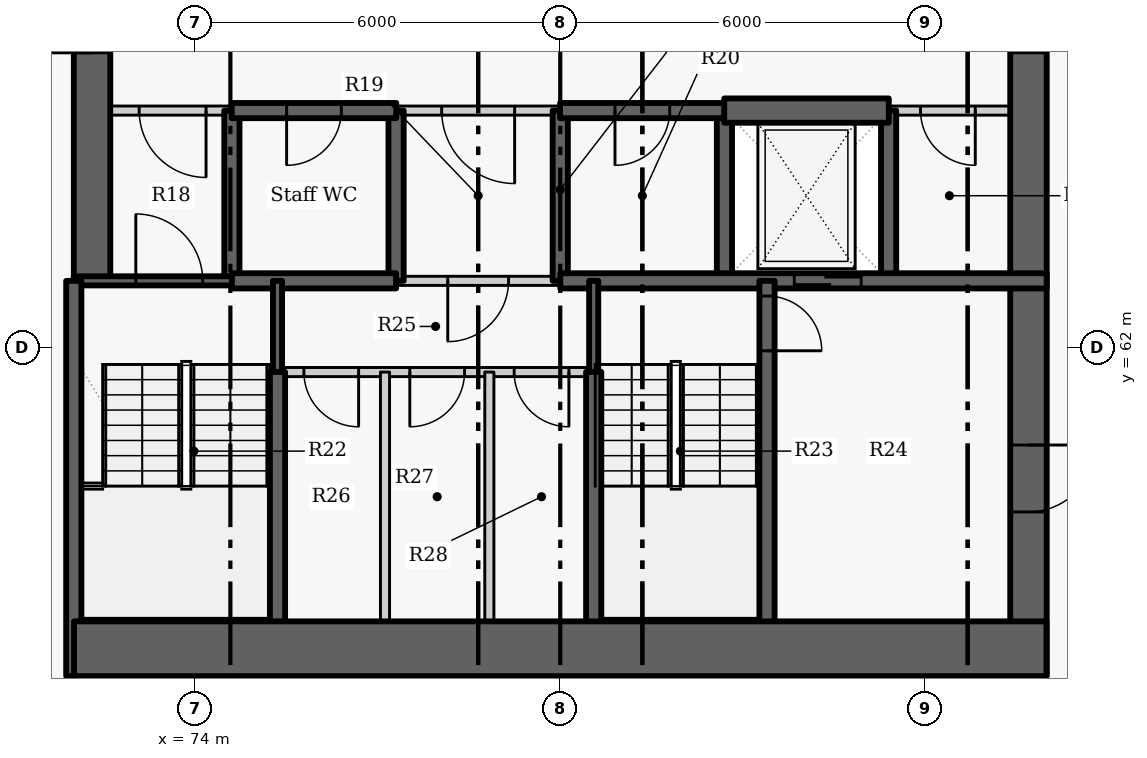
"""IFC4 building model, lengths in metres.
Left out: names, types, materials, properties, quantities, classifications, styles, units other than length and angle.
Written with IfcOpenShell. Run it as: python <this file> out.ifc"""

import sys

from ifc_helpers import new_model, si_unit, direction, frame, frame_2d, origin, place, context, subcontext, project, spatial, rectangle, extrude, element, fill, save


model = new_model("IFC4")
c1 = context("Model", 3, precision=1e-05, world=origin(), true_north=direction((0.0, 1.0)))
c2 = subcontext(c1, "Body", "Model", "MODEL_VIEW")
j1 = project(units=[si_unit("LENGTHUNIT", "METRE"), si_unit("PLANEANGLEUNIT", "RADIAN")], contexts=[c1])
p1 = place(None, origin())
s1 = spatial("IfcSite", under=j1, at=p1, CompositionType="ELEMENT")
p2 = place(p1, origin())
s2 = spatial("IfcBuilding", under=s1, at=p2, CompositionType="ELEMENT")
p3 = place(p2, frame((0.0, 0.0, 28.2)))
s3 = spatial("IfcBuildingStorey", under=s2, at=p3, CompositionType="ELEMENT", Elevation=28.2)
p4 = place(p3, frame((74.6, 63.1, -0.275), z_axis=(0.0, 0.0, 1.0), x_axis=(0.0, 1.0, 0.0)))
e1 = element("IfcWall", 1, at=p4, inside=s3, PredefinedType="SHEAR", context=c2, shape_type="SweptSolid", body=[
    extrude(rectangle(XDim=2.8, YDim=0.25, at=frame_2d((1.4, 0.0))), origin(), (0.0, 0.0, 1.0), 3.3),
])
p5 = place(p3, frame((72.3, 63.1, -0.275), z_axis=(0.0, 0.0, 1.0), x_axis=(0.0, 1.0, 0.0)))
e2 = element("IfcWall", 2, at=p5, inside=s3, PredefinedType="SHEAR", context=c2, shape_type="SweptSolid", body=[
    extrude(rectangle(XDim=9.1, YDim=0.6, at=frame_2d((4.55, 0.0))), origin(), (0.0, 0.0, 1.0), 3.3),
])
p6 = place(p5, frame((3.75, 0.0, 0.275)))
e3 = element("IfcOpeningElement", 3, at=p6, cuts=e2, PredefinedType="OPENING", context=c2, shape_type="SweptSolid", body=[
    extrude(rectangle(XDim=1.5, YDim=2.1, at=frame_2d((0.75, 1.05))), frame((0.0, 0.31, 0.0), z_axis=(0.0, -1.0, 0.0), x_axis=(1.0, 0.0, 0.0)), (0.0, 0.0, 1.0), 0.62),
])
for number, where, z_axis, x_axis in (
    (4, (77.3, 63.1, -0.275), (0.0, 0.0, 1.0), (0.0, 1.0, 0.0)),
    (5, (80.0, 63.1, -0.275), (0.0, 0.0, 1.0), (0.0, 1.0, 0.0)),
    (6, (82.7, 63.1, -0.275), (0.0, 0.0, 1.0), (0.0, 1.0, 0.0)),
    (7, (85.4, 63.1, -0.275), (0.0, 0.0, 1.0), (0.0, 1.0, 0.0)),
):
    element("IfcWall", number, at=place(p3, frame(where, z_axis=z_axis, x_axis=x_axis)), inside=s3, PredefinedType="SHEAR", context=c2, shape_type="SweptSolid", body=[
        extrude(rectangle(XDim=2.8, YDim=0.25, at=frame_2d((1.4, 0.0))), origin(), (0.0, 0.0, 1.0), 3.3),
    ])
p7 = place(p3, frame((87.7, 72.2, -0.275), z_axis=(0.0, 0.0, 1.0), x_axis=(0.0, -1.0, 0.0)))
e8 = element("IfcWall", 8, at=p7, inside=s3, PredefinedType="SHEAR", context=c2, shape_type="SweptSolid", body=[
    extrude(rectangle(XDim=15.6, YDim=0.6, at=frame_2d((7.8, 0.0))), origin(), (0.0, 0.0, 1.0), 3.3),
])
p8 = place(p7, frame((3.85, 0.0, 0.275)))
e9 = element("IfcOpeningElement", 9, at=p8, cuts=e8, PredefinedType="OPENING", context=c2, shape_type="SweptSolid", body=[
    extrude(rectangle(XDim=1.5, YDim=2.1, at=frame_2d((0.75, 1.05))), frame((0.0, 0.31, 0.0), z_axis=(0.0, -1.0, 0.0), x_axis=(1.0, 0.0, 0.0)), (0.0, 0.0, 1.0), 0.62),
])
p9 = place(p7, frame((11.8, 0.0, 0.275)))
e10 = element("IfcOpeningElement", 10, at=p9, cuts=e8, PredefinedType="OPENING", context=c2, shape_type="SweptSolid", body=[
    extrude(rectangle(XDim=1.1, YDim=2.1, at=frame_2d((0.55, 1.05))), frame((0.0, 0.31, 0.0), z_axis=(0.0, -1.0, 0.0), x_axis=(1.0, 0.0, 0.0)), (0.0, 0.0, 1.0), 0.62),
])
p10 = place(p3, frame((74.603, 65.9, 0.0), z_axis=(0.0, 0.0, 1.0), x_axis=(-1.0, 0.0, 0.0)))
e11 = element("IfcWall", 11, at=p10, inside=s3, PredefinedType="PARTITIONING", context=c2, shape_type="SweptSolid", body=[
    extrude(rectangle(XDim=2.603, YDim=0.15, at=frame_2d((1.302, 0.0))), origin(), (0.0, 0.0, 1.0), 3.025),
])
p11 = place(p10, frame((0.428, 0.0, 0.0)))
e12 = element("IfcOpeningElement", 12, at=p11, cuts=e11, PredefinedType="OPENING", context=c2, shape_type="SweptSolid", body=[
    extrude(rectangle(XDim=1.1, YDim=2.1, at=frame_2d((0.55, 1.05))), frame((0.0, 0.085, 0.0), z_axis=(0.0, -1.0, 0.0), x_axis=(1.0, 0.0, 0.0)), (0.0, 0.0, 1.0), 0.17),
])
p12 = place(p3, frame((80.003, 65.9, 0.0), z_axis=(0.0, 0.0, 1.0), x_axis=(-1.0, 0.0, 0.0)))
e13 = element("IfcWall", 13, at=p12, inside=s3, PredefinedType="PARTITIONING", context=c2, shape_type="SweptSolid", body=[
    extrude(rectangle(XDim=2.706, YDim=0.15, at=frame_2d((1.353, 0.0))), origin(), (0.0, 0.0, 1.0), 3.025),
])
p13 = place(p12, frame((0.753, 0.0, 0.0)))
e14 = element("IfcOpeningElement", 14, at=p13, cuts=e13, PredefinedType="OPENING", context=c2, shape_type="SweptSolid", body=[
    extrude(rectangle(XDim=1.2, YDim=2.1, at=frame_2d((0.6, 1.05))), frame((0.0, 0.085, 0.0), z_axis=(0.0, -1.0, 0.0), x_axis=(1.0, 0.0, 0.0)), (0.0, 0.0, 1.0), 0.17),
])
p14 = place(p3, frame((88.0, 65.9, 0.0), z_axis=(0.0, 0.0, 1.0), x_axis=(-1.0, 0.0, 0.0)))
e15 = element("IfcWall", 15, at=p14, inside=s3, PredefinedType="PARTITIONING", context=c2, shape_type="SweptSolid", body=[
    extrude(rectangle(XDim=2.603, YDim=0.15, at=frame_2d((1.302, 0.0))), origin(), (0.0, 0.0, 1.0), 3.025),
])
p15 = place(p14, frame((1.175, 0.0, 0.0)))
e16 = element("IfcOpeningElement", 16, at=p15, cuts=e15, PredefinedType="OPENING", context=c2, shape_type="SweptSolid", body=[
    extrude(rectangle(XDim=0.9, YDim=2.1, at=frame_2d((0.45, 1.05))), frame((0.0, 0.085, 0.0), z_axis=(0.0, -1.0, 0.0), x_axis=(1.0, 0.0, 0.0)), (0.0, 0.0, 1.0), 0.17),
])
p16 = place(p3, frame((77.303, 65.9, -0.275), z_axis=(0.0, 0.0, 1.0), x_axis=(-1.0, 0.0, 0.0)))
e17 = element("IfcWall", 17, at=p16, inside=s3, PredefinedType="SHEAR", context=c2, shape_type="SweptSolid", body=[
    extrude(rectangle(XDim=2.706, YDim=0.25, at=frame_2d((1.353, 0.0))), origin(), (0.0, 0.0, 1.0), 3.3),
])
p17 = place(p16, frame((0.903, 0.0, 0.275)))
e18 = element("IfcOpeningElement", 18, at=p17, cuts=e17, PredefinedType="OPENING", context=c2, shape_type="SweptSolid", body=[
    extrude(rectangle(XDim=0.9, YDim=2.1, at=frame_2d((0.45, 1.05))), frame((0.0, 0.135, 0.0), z_axis=(0.0, -1.0, 0.0), x_axis=(1.0, 0.0, 0.0)), (0.0, 0.0, 1.0), 0.27),
])
p18 = place(p3, frame((82.703, 65.9, -0.275), z_axis=(0.0, 0.0, 1.0), x_axis=(-1.0, 0.0, 0.0)))
e19 = element("IfcWall", 19, at=p18, inside=s3, PredefinedType="SHEAR", context=c2, shape_type="SweptSolid", body=[
    extrude(rectangle(XDim=2.706, YDim=0.25, at=frame_2d((1.353, 0.0))), origin(), (0.0, 0.0, 1.0), 3.3),
])
p19 = place(p18, frame((0.903, 0.0, 0.275)))
e20 = element("IfcOpeningElement", 20, at=p19, cuts=e19, PredefinedType="OPENING", context=c2, shape_type="SweptSolid", body=[
    extrude(rectangle(XDim=0.9, YDim=2.1, at=frame_2d((0.45, 1.05))), frame((0.0, 0.135, 0.0), z_axis=(0.0, -1.0, 0.0), x_axis=(1.0, 0.0, 0.0)), (0.0, 0.0, 1.0), 0.27),
])
p20 = place(p3, frame((82.697, 65.9, -0.275), z_axis=(0.0, 0.0, 1.0), x_axis=(1.0, 0.0, 0.0)))
e21 = element("IfcWall", 21, at=p20, inside=s3, PredefinedType="SHEAR", context=c2, shape_type="SweptSolid", body=[
    extrude(rectangle(XDim=2.706, YDim=0.4, at=frame_2d((1.353, 0.0))), origin(), (0.0, 0.0, 1.0), 3.3),
])
p21 = place(p3, frame((72.0, 63.1, -0.275), z_axis=(0.0, 0.0, 1.0), x_axis=(1.0, 0.0, 0.0)))
e22 = element("IfcWall", 22, at=p21, inside=s3, PredefinedType="SHEAR", context=c2, shape_type="SweptSolid", body=[
    extrude(rectangle(XDim=2.6, YDim=0.15, at=frame_2d((1.3, 0.0))), origin(), (0.0, 0.0, 1.0), 3.3),
])
p22 = place(p21, frame((1.02, 0.0, 0.275)))
e23 = element("IfcOpeningElement", 23, at=p22, cuts=e22, PredefinedType="OPENING", context=c2, shape_type="SweptSolid", body=[
    extrude(rectangle(XDim=1.1, YDim=2.1, at=frame_2d((0.55, 1.05))), frame((0.0, 0.085, 0.0), z_axis=(0.0, -1.0, 0.0), x_axis=(1.0, 0.0, 0.0)), (0.0, 0.0, 1.0), 0.17),
])
p23 = place(p3, frame((74.6, 63.1, -0.275), z_axis=(0.0, 0.0, 1.0), x_axis=(1.0, 0.0, 0.0)))
e24 = element("IfcWall", 24, at=p23, inside=s3, PredefinedType="SHEAR", context=c2, shape_type="SweptSolid", body=[
    extrude(rectangle(XDim=2.7, YDim=0.25, at=frame_2d((1.35, 0.0))), origin(), (0.0, 0.0, 1.0), 3.3),
])
p24 = place(p3, frame((80.0, 63.1, -0.275), z_axis=(0.0, 0.0, 1.0), x_axis=(1.0, 0.0, 0.0)))
e25 = element("IfcWall", 25, at=p24, inside=s3, PredefinedType="SHEAR", context=c2, shape_type="SweptSolid", body=[
    extrude(rectangle(XDim=8.0, YDim=0.25, at=frame_2d((4.0, 0.0))), origin(), (0.0, 0.0, 1.0), 3.3),
])
p25 = place(p24, frame((3.849, 0.0, 0.275)))
e26 = element("IfcOpeningElement", 26, at=p25, cuts=e25, PredefinedType="OPENING", context=c2, shape_type="SweptSolid", body=[
    extrude(rectangle(XDim=1.1, YDim=2.1, at=frame_2d((0.55, 1.05))), frame((0.0, 0.135, 0.0), z_axis=(0.0, -1.0, 0.0), x_axis=(1.0, 0.0, 0.0)), (0.0, 0.0, 1.0), 0.27),
])
p26 = place(p3, frame((80.0, 63.1, 0.0), z_axis=(0.0, 0.0, 1.0), x_axis=(-1.0, 0.0, 0.0)))
e27 = element("IfcWall", 27, at=p26, inside=s3, PredefinedType="PARTITIONING", context=c2, shape_type="SweptSolid", body=[
    extrude(rectangle(XDim=2.7, YDim=0.15, at=frame_2d((1.35, 0.0))), origin(), (0.0, 0.0, 1.0), 3.025),
])
p27 = place(p26, frame((0.85, 0.0, 0.0)))
e28 = element("IfcOpeningElement", 28, at=p27, cuts=e27, PredefinedType="OPENING", context=c2, shape_type="SweptSolid", body=[
    extrude(rectangle(XDim=1.0, YDim=2.1, at=frame_2d((0.5, 1.05))), frame((0.0, 0.085, 0.0), z_axis=(0.0, -1.0, 0.0), x_axis=(1.0, 0.0, 0.0)), (0.0, 0.0, 1.0), 0.17),
])
p28 = place(p3, frame((75.35, 61.597, -0.275), z_axis=(0.0, 0.0, 1.0), x_axis=(0.0, 1.0, 0.0)))
e29 = element("IfcWall", 29, at=p28, inside=s3, PredefinedType="SHEAR", context=c2, shape_type="SweptSolid", body=[
    extrude(rectangle(XDim=1.503, YDim=0.15, at=frame_2d((0.751, 0.0))), origin(), (0.0, 0.0, 1.0), 3.3),
])
p29 = place(p3, frame((75.35, 56.6, -0.275), z_axis=(0.0, 0.0, 1.0), x_axis=(0.0, 1.0, 0.0)))
e30 = element("IfcWall", 30, at=p29, inside=s3, PredefinedType="SHEAR", context=c2, shape_type="SweptSolid", body=[
    extrude(rectangle(XDim=5.003, YDim=0.25, at=frame_2d((2.501, 0.0))), origin(), (0.0, 0.0, 1.0), 3.3),
])
p30 = place(p3, frame((72.0, 56.6, -0.275), z_axis=(0.0, 0.0, 1.0), x_axis=(0.0, 1.0, 0.0)))
e31 = element("IfcWall", 31, at=p30, inside=s3, PredefinedType="SHEAR", context=c2, shape_type="SweptSolid", body=[
    extrude(rectangle(XDim=6.5, YDim=0.25, at=frame_2d((3.25, 0.0))), origin(), (0.0, 0.0, 1.0), 3.3),
])
p31 = place(p3, frame((83.4, 63.1, -0.275), z_axis=(0.0, 0.0, 1.0), x_axis=(0.0, -1.0, 0.0)))
e32 = element("IfcWall", 32, at=p31, inside=s3, PredefinedType="SHEAR", context=c2, shape_type="SweptSolid", body=[
    extrude(rectangle(XDim=6.5, YDim=0.25, at=frame_2d((3.25, 0.0))), origin(), (0.0, 0.0, 1.0), 3.3),
])
p32 = place(p31, frame((0.25, 0.0, 0.275)))
e33 = element("IfcOpeningElement", 33, at=p32, cuts=e32, PredefinedType="OPENING", context=c2, shape_type="SweptSolid", body=[
    extrude(rectangle(XDim=0.9, YDim=2.1, at=frame_2d((0.45, 1.05))), frame((0.0, 0.135, 0.0), z_axis=(0.0, -1.0, 0.0), x_axis=(1.0, 0.0, 0.0)), (0.0, 0.0, 1.0), 0.27),
])
p33 = place(p3, frame((80.55, 61.597, -0.275), z_axis=(0.0, 0.0, 1.0), x_axis=(0.0, 1.0, 0.0)))
e34 = element("IfcWall", 34, at=p33, inside=s3, PredefinedType="SHEAR", context=c2, shape_type="SweptSolid", body=[
    extrude(rectangle(XDim=1.503, YDim=0.15, at=frame_2d((0.751, 0.0))), origin(), (0.0, 0.0, 1.0), 3.3),
])
p34 = place(p3, frame((80.55, 56.6, -0.275), z_axis=(0.0, 0.0, 1.0), x_axis=(0.0, 1.0, 0.0)))
e35 = element("IfcWall", 35, at=p34, inside=s3, PredefinedType="SHEAR", context=c2, shape_type="SweptSolid", body=[
    extrude(rectangle(XDim=5.003, YDim=0.25, at=frame_2d((2.501, 0.0))), origin(), (0.0, 0.0, 1.0), 3.3),
])
p35 = place(p3, frame((80.55, 61.6, 0.0), z_axis=(0.0, 0.0, 1.0), x_axis=(-1.0, 0.0, 0.0)))
e36 = element("IfcWall", 36, at=p35, inside=s3, PredefinedType="PARTITIONING", context=c2, shape_type="SweptSolid", body=[
    extrude(rectangle(XDim=5.2, YDim=0.15, at=frame_2d((2.6, 0.0))), origin(), (0.0, 0.0, 1.0), 3.025),
])
p36 = place(p35, frame((3.866, 0.0, 0.0)))
e37 = element("IfcOpeningElement", 37, at=p36, cuts=e36, PredefinedType="OPENING", context=c2, shape_type="SweptSolid", body=[
    extrude(rectangle(XDim=0.9, YDim=2.1, at=frame_2d((0.45, 1.05))), frame((0.0, 0.085, 0.0), z_axis=(0.0, -1.0, 0.0), x_axis=(1.0, 0.0, 0.0)), (0.0, 0.0, 1.0), 0.17),
])
p37 = place(p35, frame((2.124, 0.0, 0.0)))
e38 = element("IfcOpeningElement", 38, at=p37, cuts=e36, PredefinedType="OPENING", context=c2, shape_type="SweptSolid", body=[
    extrude(rectangle(XDim=0.9, YDim=2.1, at=frame_2d((0.45, 1.05))), frame((0.0, 0.085, 0.0), z_axis=(0.0, -1.0, 0.0), x_axis=(1.0, 0.0, 0.0)), (0.0, 0.0, 1.0), 0.17),
])
p38 = place(p35, frame((0.408, 0.0, 0.0)))
e39 = element("IfcOpeningElement", 39, at=p38, cuts=e36, PredefinedType="OPENING", context=c2, shape_type="SweptSolid", body=[
    extrude(rectangle(XDim=0.9, YDim=2.1, at=frame_2d((0.45, 1.05))), frame((0.0, 0.085, 0.0), z_axis=(0.0, -1.0, 0.0), x_axis=(1.0, 0.0, 0.0)), (0.0, 0.0, 1.0), 0.17),
])
for number, where, z_axis, x_axis in (
    (40, (77.118, 56.6, 0.0), (0.0, 0.0, 1.0), (0.0, 1.0, 0.0)),
    (41, (78.834, 56.6, 0.0), (0.0, 0.0, 1.0), (0.0, 1.0, 0.0)),
):
    element("IfcWall", number, at=place(p3, frame(where, z_axis=z_axis, x_axis=x_axis)), inside=s3, PredefinedType="PARTITIONING", context=c2, shape_type="SweptSolid", body=[
        extrude(rectangle(XDim=5.0, YDim=0.15, at=frame_2d((2.5, 0.0))), origin(), (0.0, 0.0, 1.0), 3.025),
    ])
p39 = place(p3, frame((72.004, 57.05, -0.275), z_axis=(0.0, 0.0, 1.0), x_axis=(1.0, 0.0, 0.0)))
e42 = element("IfcWall", 42, at=p39, inside=s3, PredefinedType="SHEAR", context=c2, shape_type="SweptSolid", body=[
    extrude(rectangle(XDim=15.992, YDim=0.9, at=frame_2d((7.996, 0.0))), origin(), (0.0, 0.0, 1.0), 3.3),
])
p40 = place(p11, origin())
e43 = element("IfcDoor", 43, at=p40, inside=s3, OperationType="SINGLE_SWING_LEFT", PredefinedType="DOOR", context=c2, shape_type="SweptSolid", body=[
    extrude(rectangle(XDim=1.1, YDim=2.1, at=frame_2d((0.55, 1.05))), frame((0.0, 0.025, 0.0), z_axis=(0.0, -1.0, 0.0), x_axis=(1.0, 0.0, 0.0)), (0.0, 0.0, 1.0), 0.05),
])
fill(e12, e43)
p41 = place(p17, origin())
e44 = element("IfcDoor", 44, at=p41, inside=s3, OperationType="SINGLE_SWING_RIGHT", PredefinedType="DOOR", context=c2, shape_type="SweptSolid", body=[
    extrude(rectangle(XDim=0.9, YDim=2.1, at=frame_2d((0.45, 1.05))), frame((0.0, 0.025, 0.0), z_axis=(0.0, -1.0, 0.0), x_axis=(1.0, 0.0, 0.0)), (0.0, 0.0, 1.0), 0.05),
])
fill(e18, e44)
p42 = place(p13, origin())
e45 = element("IfcDoor", 45, at=p42, inside=s3, OperationType="DOUBLE_DOOR_SINGLE_SWING", PredefinedType="DOOR", context=c2, shape_type="SweptSolid", body=[
    extrude(rectangle(XDim=1.2, YDim=2.1, at=frame_2d((0.6, 1.05))), frame((0.0, 0.025, 0.0), z_axis=(0.0, -1.0, 0.0), x_axis=(1.0, 0.0, 0.0)), (0.0, 0.0, 1.0), 0.05),
])
fill(e14, e45)
p43 = place(p19, origin())
e46 = element("IfcDoor", 46, at=p43, inside=s3, OperationType="SINGLE_SWING_RIGHT", PredefinedType="DOOR", context=c2, shape_type="SweptSolid", body=[
    extrude(rectangle(XDim=0.9, YDim=2.1, at=frame_2d((0.45, 1.05))), frame((0.0, 0.025, 0.0), z_axis=(0.0, -1.0, 0.0), x_axis=(1.0, 0.0, 0.0)), (0.0, 0.0, 1.0), 0.05),
])
fill(e20, e46)
p44 = place(p25, origin())
e47 = element("IfcDoor", 47, at=p44, inside=s3, OperationType="SLIDING_TO_LEFT", PredefinedType="DOOR", context=c2, shape_type="SweptSolid", body=[
    extrude(rectangle(XDim=1.1, YDim=2.1, at=frame_2d((0.55, 1.05))), frame((0.0, 0.025, 0.0), z_axis=(0.0, -1.0, 0.0), x_axis=(1.0, 0.0, 0.0)), (0.0, 0.0, 1.0), 0.05),
])
fill(e26, e47)
p45 = place(p15, origin())
e48 = element("IfcDoor", 48, at=p45, inside=s3, OperationType="SINGLE_SWING_LEFT", PredefinedType="DOOR", context=c2, shape_type="SweptSolid", body=[
    extrude(rectangle(XDim=0.9, YDim=2.1, at=frame_2d((0.45, 1.05))), frame((0.0, 0.025, 0.0), z_axis=(0.0, -1.0, 0.0), x_axis=(1.0, 0.0, 0.0)), (0.0, 0.0, 1.0), 0.05),
])
fill(e16, e48)
p46 = place(p27, origin())
e49 = element("IfcDoor", 49, at=p46, inside=s3, OperationType="SINGLE_SWING_RIGHT", PredefinedType="DOOR", context=c2, shape_type="SweptSolid", body=[
    extrude(rectangle(XDim=1.0, YDim=2.1, at=frame_2d((0.5, 1.05))), frame((0.0, 0.025, 0.0), z_axis=(0.0, -1.0, 0.0), x_axis=(1.0, 0.0, 0.0)), (0.0, 0.0, 1.0), 0.05),
])
fill(e28, e49)
p47 = place(p36, origin())
e50 = element("IfcDoor", 50, at=p47, inside=s3, OperationType="SINGLE_SWING_LEFT", PredefinedType="DOOR", context=c2, shape_type="SweptSolid", body=[
    extrude(rectangle(XDim=0.9, YDim=2.1, at=frame_2d((0.45, 1.05))), frame((0.0, 0.025, 0.0), z_axis=(0.0, -1.0, 0.0), x_axis=(1.0, 0.0, 0.0)), (0.0, 0.0, 1.0), 0.05),
])
fill(e37, e50)
p48 = place(p37, origin())
e51 = element("IfcDoor", 51, at=p48, inside=s3, OperationType="SINGLE_SWING_RIGHT", PredefinedType="DOOR", context=c2, shape_type="SweptSolid", body=[
    extrude(rectangle(XDim=0.9, YDim=2.1, at=frame_2d((0.45, 1.05))), frame((0.0, 0.025, 0.0), z_axis=(0.0, -1.0, 0.0), x_axis=(1.0, 0.0, 0.0)), (0.0, 0.0, 1.0), 0.05),
])
fill(e38, e51)
p49 = place(p38, origin())
e52 = element("IfcDoor", 52, at=p49, inside=s3, OperationType="SINGLE_SWING_LEFT", PredefinedType="DOOR", context=c2, shape_type="SweptSolid", body=[
    extrude(rectangle(XDim=0.9, YDim=2.1, at=frame_2d((0.45, 1.05))), frame((0.0, 0.025, 0.0), z_axis=(0.0, -1.0, 0.0), x_axis=(1.0, 0.0, 0.0)), (0.0, 0.0, 1.0), 0.05),
])
fill(e39, e52)
p50 = place(p22, origin())
e53 = element("IfcDoor", 53, at=p50, inside=s3, OperationType="SINGLE_SWING_LEFT", PredefinedType="DOOR", context=c2, shape_type="SweptSolid", body=[
    extrude(rectangle(XDim=1.1, YDim=2.1, at=frame_2d((0.55, 1.05))), frame((0.0, 0.025, 0.0), z_axis=(0.0, -1.0, 0.0), x_axis=(1.0, 0.0, 0.0)), (0.0, 0.0, 1.0), 0.05),
])
fill(e23, e53)
p51 = place(p32, origin())
e54 = element("IfcDoor", 54, at=p51, inside=s3, OperationType="SINGLE_SWING_RIGHT", PredefinedType="DOOR", context=c2, shape_type="SweptSolid", body=[
    extrude(rectangle(XDim=0.9, YDim=2.1, at=frame_2d((0.45, 1.05))), frame((0.0, 0.025, 0.0), z_axis=(0.0, -1.0, 0.0), x_axis=(1.0, 0.0, 0.0)), (0.0, 0.0, 1.0), 0.05),
])
fill(e33, e54)
p52 = place(p8, origin())
e55 = element("IfcDoor", 55, at=p52, inside=s3, OperationType="DOUBLE_DOOR_SINGLE_SWING", PredefinedType="DOOR", context=c2, shape_type="SweptSolid", body=[
    extrude(rectangle(XDim=1.5, YDim=2.1, at=frame_2d((0.75, 1.05))), frame((0.0, 0.025, 0.0), z_axis=(0.0, -1.0, 0.0), x_axis=(1.0, 0.0, 0.0)), (0.0, 0.0, 1.0), 0.05),
])
fill(e9, e55)
p53 = place(p9, origin())
e56 = element("IfcDoor", 56, at=p53, inside=s3, OperationType="SINGLE_SWING_LEFT", PredefinedType="DOOR", context=c2, shape_type="SweptSolid", body=[
    extrude(rectangle(XDim=1.1, YDim=2.1, at=frame_2d((0.55, 1.05))), frame((0.0, 0.025, 0.0), z_axis=(0.0, -1.0, 0.0), x_axis=(1.0, 0.0, 0.0)), (0.0, 0.0, 1.0), 0.05),
])
fill(e10, e56)
save(model, sys.argv[1])
